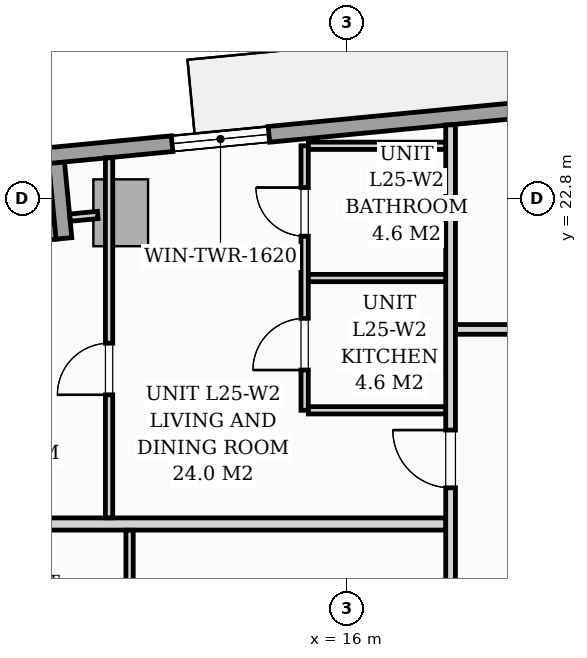
"""IFC4 building model, lengths in metres.
Left out: names, types, materials, properties, quantities, classifications, styles, units other than length and angle.
Written with IfcOpenShell. Run it as: python <this file> out.ifc"""

import sys

from ifc_helpers import new_model, si_unit, direction, frame, frame_2d, origin, origin_2d, place, context, subcontext, project, spatial, rectangle, extrude, source, transform, mapped, element, fill, save


model = new_model("IFC4")
c1 = context("Model", 3, precision=1e-05, world=origin(), true_north=direction((0.0, 1.0)))
c2 = subcontext(c1, "Body", "Model", "MODEL_VIEW")
j1 = project(units=[si_unit("LENGTHUNIT", "METRE"), si_unit("PLANEANGLEUNIT", "RADIAN")], contexts=[c1])
p1 = place(None, origin())
s1 = spatial("IfcSite", under=j1, at=p1, CompositionType="ELEMENT")
p2 = place(p1, origin())
s2 = spatial("IfcBuilding", under=s1, at=p2, CompositionType="ELEMENT")
p3 = place(p2, frame((0.0, 0.0, 90.6)))
s3 = spatial("IfcBuildingStorey", under=s2, at=p3, CompositionType="ELEMENT", Elevation=90.6)
m1 = source(origin(), c2, "Body", "SweptSolid", [
    extrude(rectangle(XDim=0.9, YDim=1.1, at=origin_2d()), origin(), (0.0, 0.0, 1.0), 3.196),
])
p4 = place(p3, frame((12.275, 22.568, 0.002), z_axis=(0.0, 0.0, 1.0), x_axis=(0.995396198367, 0.09584575252, 0.0)))
e1 = element("IfcColumn", 1, at=p4, inside=s3, PredefinedType="COLUMN", context=c2, shape_type="MappedRepresentation", body=[
    mapped(m1, transform((0.0, 0.0, 0.0), scale=1.0)),
])
p5 = place(p3, frame((9.826, 22.131, 0.0), z_axis=(0.0, 0.0, 1.0), x_axis=(0.995389446633, 0.095915846097, 0.0)))
e2 = element("IfcWall", 2, at=p5, inside=s3, PredefinedType="STANDARD", context=c2, shape_type="SweptSolid", body=[
    extrude(rectangle(XDim=1.395, YDim=0.26, at=frame_2d((0.697, 0.0))), origin(), (0.0, 0.0, 1.0), 2.94),
])
p6 = place(p3, frame((11.341, 22.147, 0.0), z_axis=(0.0, 0.0, 1.0), x_axis=(-0.09589913835, 0.995391056452, 0.0)))
e3 = element("IfcWall", 3, at=p6, inside=s3, PredefinedType="STANDARD", context=c2, shape_type="SweptSolid", body=[
    extrude(rectangle(XDim=1.395, YDim=0.26, at=frame_2d((0.698, 0.0))), origin(), (0.0, 0.0, 1.0), 2.94),
])
p7 = place(p3, frame((11.08, 23.508, 0.0), z_axis=(0.0, 0.0, 1.0), x_axis=(0.995396638587, 0.095841180552, 0.0)))
e4 = element("IfcWall", 4, at=p7, inside=s3, PredefinedType="STANDARD", context=c2, shape_type="SweptSolid", body=[
    extrude(rectangle(XDim=19.11, YDim=0.26, at=frame_2d((9.555, 0.0))), origin(), (0.0, 0.0, 1.0), 2.94),
])
p8 = place(p7, frame((8.514, 0.0, 0.0)))
e5 = element("IfcOpeningElement", 5, at=p8, cuts=e4, PredefinedType="OPENING", context=c2, shape_type="SweptSolid", body=[
    extrude(rectangle(XDim=1.8, YDim=2.06, at=frame_2d((0.9, 1.03))), frame((0.0, 0.14, 0.0), z_axis=(0.0, -1.0, 0.0), x_axis=(1.0, 0.0, 0.0)), (0.0, 0.0, 1.0), 0.28),
])
p9 = place(p7, frame((2.05, 0.0, 0.65)))
e6 = element("IfcOpeningElement", 6, at=p9, cuts=e4, PredefinedType="OPENING", context=c2, shape_type="SweptSolid", body=[
    extrude(rectangle(XDim=1.6, YDim=1.5, at=frame_2d((0.8, 0.75))), frame((0.0, 0.14, 0.0), z_axis=(0.0, -1.0, 0.0), x_axis=(1.0, 0.0, 0.0)), (0.0, 0.0, 1.0), 0.28),
])
p10 = place(p3, frame((17.7, 12.572, 0.0), z_axis=(0.0, 0.0, 1.0), x_axis=(0.0, 1.0, 0.0)))
e7 = element("IfcWall", 7, at=p10, inside=s3, PredefinedType="PARTITIONING", context=c2, shape_type="SweptSolid", body=[
    extrude(rectangle(XDim=11.441, YDim=0.16, at=frame_2d((5.72, 0.0))), origin(), (0.0, 0.0, 1.0), 2.94),
])
p11 = place(p10, frame((0.493, 0.0, 0.0)))
e8 = element("IfcOpeningElement", 8, at=p11, cuts=e7, PredefinedType="OPENING", context=c2, shape_type="SweptSolid", body=[
    extrude(rectangle(XDim=0.95, YDim=2.06, at=frame_2d((0.475, 1.03))), frame((0.0, 0.09, 0.0), z_axis=(0.0, -1.0, 0.0), x_axis=(1.0, 0.0, 0.0)), (0.0, 0.0, 1.0), 0.18),
])
p12 = place(p10, frame((5.473, 0.0, 0.0)))
e9 = element("IfcOpeningElement", 9, at=p12, cuts=e7, PredefinedType="OPENING", context=c2, shape_type="SweptSolid", body=[
    extrude(rectangle(XDim=0.95, YDim=2.06, at=frame_2d((0.475, 1.03))), frame((0.0, 0.09, 0.0), z_axis=(0.0, -1.0, 0.0), x_axis=(1.0, 0.0, 0.0)), (0.0, 0.0, 1.0), 0.18),
])
p13 = place(p3, frame((9.232, 17.45, 0.0), z_axis=(0.0, 0.0, 1.0), x_axis=(1.0, 0.0, 0.0)))
e10 = element("IfcWall", 10, at=p13, inside=s3, PredefinedType="PARTITIONING", context=c2, shape_type="SweptSolid", body=[
    extrude(rectangle(XDim=8.386, YDim=0.2, at=frame_2d((4.193, 0.0))), origin(), (0.0, 0.0, 1.0), 2.94),
])
p14 = place(p3, frame((12.421, 5.194, 0.0), z_axis=(0.0, 0.0, 1.0), x_axis=(0.0, 1.0, 0.0)))
e11 = element("IfcWall", 11, at=p14, inside=s3, PredefinedType="PARTITIONING", context=c2, shape_type="SweptSolid", body=[
    extrude(rectangle(XDim=12.154, YDim=0.12, at=frame_2d((6.077, 0.0))), origin(), (0.0, 0.0, 1.0), 2.94),
])
p15 = place(p14, frame((5.516, 0.0, 0.0)))
e12 = element("IfcOpeningElement", 12, at=p15, cuts=e11, PredefinedType="OPENING", context=c2, shape_type="SweptSolid", body=[
    extrude(rectangle(XDim=0.85, YDim=2.05, at=frame_2d((0.425, 1.025))), frame((0.0, 0.07, 0.0), z_axis=(0.0, -1.0, 0.0), x_axis=(1.0, 0.0, 0.0)), (0.0, 0.0, 1.0), 0.14),
])
p16 = place(p3, frame((15.3, 19.32, 0.0), z_axis=(0.0, 0.0, 1.0), x_axis=(0.0, 1.0, 0.0)))
e13 = element("IfcWall", 13, at=p16, inside=s3, PredefinedType="PARTITIONING", context=c2, shape_type="SweptSolid", body=[
    extrude(rectangle(XDim=4.35, YDim=0.12, at=frame_2d((2.175, 0.0))), origin(), (0.0, 0.0, 1.0), 2.94),
])
p17 = place(p16, frame((0.662, 0.0, 0.0)))
e14 = element("IfcOpeningElement", 14, at=p17, cuts=e13, PredefinedType="OPENING", context=c2, shape_type="SweptSolid", body=[
    extrude(rectangle(XDim=0.85, YDim=2.05, at=frame_2d((0.425, 1.025))), frame((0.0, 0.07, 0.0), z_axis=(0.0, -1.0, 0.0), x_axis=(1.0, 0.0, 0.0)), (0.0, 0.0, 1.0), 0.14),
])
p18 = place(p16, frame((2.863, 0.0, 0.0)))
e15 = element("IfcOpeningElement", 15, at=p18, cuts=e13, PredefinedType="OPENING", context=c2, shape_type="SweptSolid", body=[
    extrude(rectangle(XDim=0.8, YDim=2.02, at=frame_2d((0.4, 1.01))), frame((0.0, 0.07, 0.0), z_axis=(0.0, -1.0, 0.0), x_axis=(1.0, 0.0, 0.0)), (0.0, 0.0, 1.0), 0.14),
])
for number, where, z_axis, x_axis in (
    (16, (15.362, 21.495, 0.0), (0.0, 0.0, 1.0), (1.0, 0.0, 0.0)),
    (17, (15.362, 19.32, 0.0), (0.0, 0.0, 1.0), (1.0, 0.0, 0.0)),
):
    element("IfcWall", number, at=place(p3, frame(where, z_axis=z_axis, x_axis=x_axis)), inside=s3, PredefinedType="PARTITIONING", context=c2, shape_type="SweptSolid", body=[
        extrude(rectangle(XDim=2.256, YDim=0.12, at=frame_2d((1.128, 0.0))), origin(), (0.0, 0.0, 1.0), 2.94),
    ])
p19 = place(p3, frame((15.362, 23.67, 0.0), z_axis=(0.0, 0.0, 1.0), x_axis=(1.0, 0.0, 0.0)))
e18 = element("IfcWall", 18, at=p19, inside=s3, PredefinedType="PARTITIONING", context=c2, shape_type="SweptSolid", body=[
    extrude(rectangle(XDim=2.256, YDim=0.12, at=frame_2d((1.128, 0.0))), origin(), (0.0, 0.0, 1.0), 2.31),
])
p20 = place(p3, frame((12.084, 17.552, 0.0), z_axis=(0.0, 0.0, 1.0), x_axis=(0.0, 1.0, 0.0)))
e19 = element("IfcWall", 19, at=p20, inside=s3, PredefinedType="PARTITIONING", context=c2, shape_type="SweptSolid", body=[
    extrude(rectangle(XDim=5.92, YDim=0.12, at=frame_2d((2.96, 0.0))), origin(), (0.0, 0.0, 1.0), 2.31),
])
p21 = place(p20, frame((2.022, 0.0, 0.0)))
e20 = element("IfcOpeningElement", 20, at=p21, cuts=e19, PredefinedType="OPENING", context=c2, shape_type="SweptSolid", body=[
    extrude(rectangle(XDim=0.85, YDim=2.05, at=frame_2d((0.425, 1.025))), frame((0.0, 0.07, 0.0), z_axis=(0.0, -1.0, 0.0), x_axis=(1.0, 0.0, 0.0)), (0.0, 0.0, 1.0), 0.14),
])
p22 = place(p3, frame((17.782, 20.65, 0.0), z_axis=(0.0, 0.0, 1.0), x_axis=(1.0, 0.0, 0.0)))
e21 = element("IfcWall", 21, at=p22, inside=s3, PredefinedType="PARTITIONING", context=c2, shape_type="SweptSolid", body=[
    extrude(rectangle(XDim=1.786, YDim=0.16, at=frame_2d((0.893, 0.0))), origin(), (0.0, 0.0, 1.0), 2.94),
])
p23 = place(p3, frame((11.897, 22.532, 0.0), z_axis=(0.0, 0.0, 1.0), x_axis=(-0.995384576284, -0.09596637586, 0.0)))
e22 = element("IfcWall", 22, at=p23, inside=s3, PredefinedType="PARTITIONING", context=c2, shape_type="SweptSolid", body=[
    extrude(rectangle(XDim=0.458, YDim=0.12, at=frame_2d((0.229, 0.0))), origin(), (0.0, 0.0, 1.0), 2.94),
])
m2 = source(origin(), c2, "Body", "SweptSolid", [
    extrude(rectangle(XDim=1.6, YDim=1.5, at=frame_2d((0.8, 0.75))), frame((0.0, 0.03, 0.0), z_axis=(0.0, -1.0, 0.0), x_axis=(1.0, 0.0, 0.0)), (0.0, 0.0, 1.0), 0.06),
])
p24 = place(p9, origin())
e23 = element("IfcWindow", 23, at=p24, inside=s3, PartitioningType="SINGLE_PANEL", PredefinedType="WINDOW", context=c2, shape_type="MappedRepresentation", body=[
    mapped(m2, transform((0.0, 0.0, 0.0), scale=1.0)),
])
fill(e6, e23)
m3 = source(origin(), c2, "Body", "SweptSolid", [
    extrude(rectangle(XDim=0.95, YDim=2.06, at=frame_2d((0.475, 1.03))), frame((0.0, 0.025, 0.0), z_axis=(0.0, -1.0, 0.0), x_axis=(1.0, 0.0, 0.0)), (0.0, 0.0, 1.0), 0.05),
])
p25 = place(p12, origin())
e24 = element("IfcDoor", 24, at=p25, inside=s3, OperationType="SINGLE_SWING_RIGHT", PredefinedType="DOOR", context=c2, shape_type="MappedRepresentation", body=[
    mapped(m3, transform((0.0, 0.0, 0.0), scale=1.0)),
])
fill(e9, e24)
m4 = source(origin(), c2, "Body", "SweptSolid", [
    extrude(rectangle(XDim=0.85, YDim=2.05, at=frame_2d((0.425, 1.025))), frame((0.0, 0.025, 0.0), z_axis=(0.0, -1.0, 0.0), x_axis=(1.0, 0.0, 0.0)), (0.0, 0.0, 1.0), 0.05),
])
p26 = place(p17, origin())
e25 = element("IfcDoor", 25, at=p26, inside=s3, OperationType="SINGLE_SWING_LEFT", PredefinedType="DOOR", context=c2, shape_type="MappedRepresentation", body=[
    mapped(m4, transform((0.0, 0.0, 0.0), scale=1.0)),
])
fill(e14, e25)
m5 = source(origin(), c2, "Body", "SweptSolid", [
    extrude(rectangle(XDim=0.8, YDim=2.02, at=frame_2d((0.4, 1.01))), frame((0.0, 0.025, 0.0), z_axis=(0.0, -1.0, 0.0), x_axis=(1.0, 0.0, 0.0)), (0.0, 0.0, 1.0), 0.05),
])
p27 = place(p18, origin())
e26 = element("IfcDoor", 26, at=p27, inside=s3, OperationType="SINGLE_SWING_RIGHT", PredefinedType="DOOR", context=c2, shape_type="MappedRepresentation", body=[
    mapped(m5, transform((0.0, 0.0, 0.0), scale=1.0)),
])
fill(e15, e26)
p28 = place(p21, origin())
e27 = element("IfcDoor", 27, at=p28, inside=s3, OperationType="SINGLE_SWING_LEFT", PredefinedType="DOOR", context=c2, shape_type="MappedRepresentation", body=[
    mapped(m4, transform((0.0, 0.0, 0.0), scale=1.0)),
])
fill(e20, e27)
save(model, sys.argv[1])
